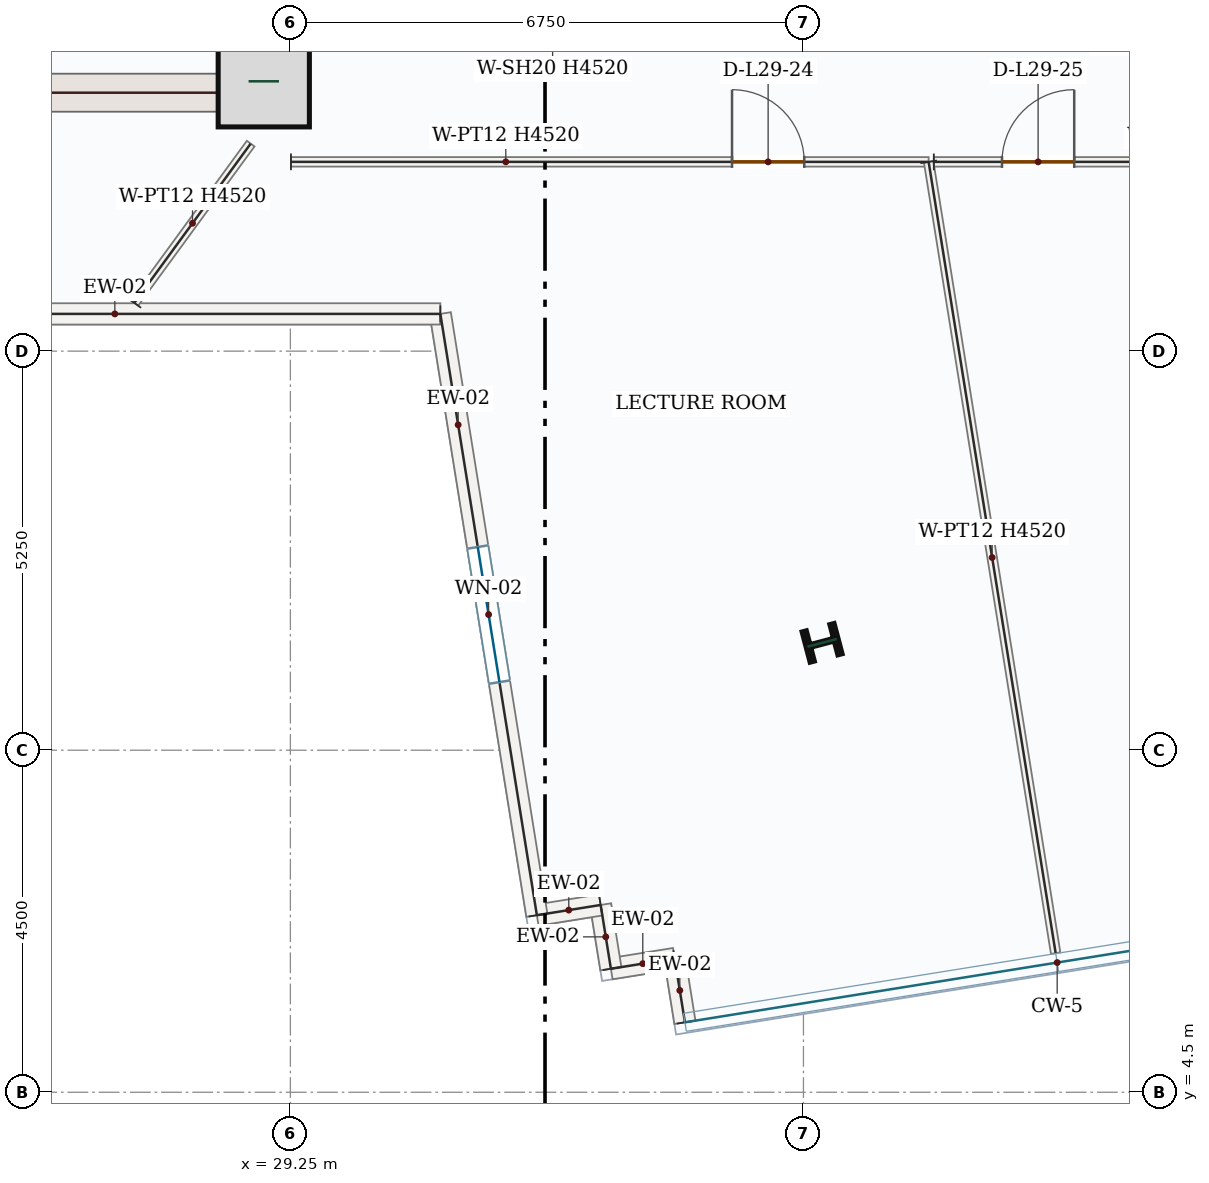
"""IFC4 building model, lengths in metres.
Left out: names, types, materials, properties, quantities, classifications, styles, units other than length and angle.
Written with IfcOpenShell. Run it as: python <this file> out.ifc"""

import sys

from ifc_helpers import new_model, si_unit, direction, frame, frame_2d, origin, origin_2d, place, context, subcontext, project, spatial, rectangle, i_section, extrude, source, transform, mapped, element, fill, save


model = new_model("IFC4")
c1 = context("Model", 3, precision=1e-05, world=origin(), true_north=direction((0.0, 1.0)))
c2 = subcontext(c1, "Body", "Model", "MODEL_VIEW")
j1 = project(units=[si_unit("LENGTHUNIT", "METRE"), si_unit("PLANEANGLEUNIT", "RADIAN")], contexts=[c1])
p1 = place(None, origin())
s1 = spatial("IfcSite", under=j1, at=p1, CompositionType="ELEMENT")
p2 = place(p1, origin())
s2 = spatial("IfcBuilding", under=s1, at=p2, CompositionType="ELEMENT")
p3 = place(p2, frame((0.0, 0.0, 130.8)))
s3 = spatial("IfcBuildingStorey", under=s2, at=p3, CompositionType="ELEMENT", Elevation=130.8)
p4 = place(p3, frame((29.0, 17.4, 0.0), z_axis=(0.0, 0.0, 1.0), x_axis=(0.0, 1.0, 0.0)))
e1 = element("IfcWall", 1, at=p4, inside=s3, PredefinedType="SHEAR", context=c2, shape_type="SweptSolid", body=[
    extrude(rectangle(XDim=8.55, YDim=0.5, at=frame_2d((4.275, 0.0))), origin(), (0.0, 0.0, 1.0), 4.52),
])
p5 = place(p4, frame((6.65, 0.0, 0.0)))
e2 = element("IfcOpeningElement", 2, at=p5, cuts=e1, PredefinedType="OPENING", context=c2, shape_type="SweptSolid", body=[
    extrude(rectangle(XDim=1.1, YDim=2.2, at=frame_2d((0.55, 1.1))), frame((0.0, 0.26, 0.0), z_axis=(0.0, -1.0, 0.0), x_axis=(1.0, 0.0, 0.0)), (0.0, 0.0, 1.0), 0.52),
])
p6 = place(p4, frame((2.7, 0.0, 0.0)))
e3 = element("IfcOpeningElement", 3, at=p6, cuts=e1, PredefinedType="OPENING", context=c2, shape_type="SweptSolid", body=[
    extrude(rectangle(XDim=0.88, YDim=2.1, at=frame_2d((0.44, 1.05))), frame((0.0, 0.26, 0.0), z_axis=(0.0, -1.0, 0.0), x_axis=(1.0, 0.0, 0.0)), (0.0, 0.0, 1.0), 0.52),
])
p7 = place(p4, frame((4.6, 0.0, 0.0)))
e4 = element("IfcOpeningElement", 4, at=p7, cuts=e1, PredefinedType="OPENING", context=c2, shape_type="SweptSolid", body=[
    extrude(rectangle(XDim=0.88, YDim=2.1, at=frame_2d((0.44, 1.05))), frame((0.0, 0.26, 0.0), z_axis=(0.0, -1.0, 0.0), x_axis=(1.0, 0.0, 0.0)), (0.0, 0.0, 1.0), 0.52),
])
m1 = source(origin(), c2, "Body", "SweptSolid", [
    extrude(rectangle(XDim=7.0, YDim=0.5, at=frame_2d((3.5, 0.0))), origin(), (0.0, 0.0, 1.0), 4.52),
])
p8 = place(p3, frame((21.75, 17.65, 0.0), z_axis=(0.0, 0.0, 1.0), x_axis=(1.0, 0.0, 0.0)))
e5 = element("IfcWall", 5, at=p8, inside=s3, PredefinedType="SHEAR", context=c2, shape_type="MappedRepresentation", body=[
    mapped(m1, transform((0.0, 0.0, 0.0), x_axis=(1.0, 0.0, 0.0), y_axis=(0.0, 1.0, 0.0), z_axis=(0.0, 0.0, 1.0), scale=1.0)),
])
m2 = source(origin(), c2, "Body", "SweptSolid", [
    extrude(rectangle(XDim=1.2, YDim=1.2, at=origin_2d()), origin(), (0.0, 0.0, 1.0), 4.8),
])
p9 = place(p3, frame((28.9, 17.8, 0.0), z_axis=(0.0, 0.0, 1.0), x_axis=(1.0, 0.0, 0.0)))
e6 = element("IfcColumn", 6, at=p9, inside=s3, PredefinedType="COLUMN", context=c2, shape_type="MappedRepresentation", body=[
    mapped(m2, transform((0.0, 0.0, 0.0), x_axis=(1.0, 0.0, 0.0), y_axis=(0.0, 1.0, 0.0), z_axis=(0.0, 0.0, 1.0), scale=1.0)),
])
m3 = source(origin(), c2, "Body", "SweptSolid", [
    extrude(i_section(OverallWidth=0.412, OverallDepth=0.435, WebThickness=0.036, FlangeThickness=0.057, FilletRadius=0.018, at=origin_2d()), origin(), (0.0, 0.0, 1.0), 4.8),
])
p10 = place(p3, frame((36.245, 10.412, 0.0), z_axis=(0.0, 0.0, 1.0), x_axis=(-0.255445757936, 0.966823388604, 0.0)))
e7 = element("IfcColumn", 7, at=p10, inside=s3, PredefinedType="COLUMN", context=c2, shape_type="MappedRepresentation", body=[
    mapped(m3, transform((0.0, 0.0, 0.0), x_axis=(1.0, 0.0, 0.0), y_axis=(0.0, 1.0, 0.0), z_axis=(0.0, 0.0, 1.0), scale=1.0)),
])
m4 = source(origin(), c2, "Body", "SweptSolid", [
    extrude(rectangle(XDim=0.85, YDim=0.28, at=frame_2d((0.425, 0.0))), origin(), (0.0, 0.0, 1.0), 4.52),
])
p11 = place(p3, frame((34.441, 5.42, 0.0), z_axis=(0.0, 0.0, 1.0), x_axis=(-0.158528116284, 0.987354463376, 0.0)))
e8 = element("IfcWall", 8, at=p11, inside=s3, PredefinedType="SOLIDWALL", context=c2, shape_type="MappedRepresentation", body=[
    mapped(m4, transform((0.0, 0.0, 0.0), x_axis=(1.0, 0.0, 0.0), y_axis=(0.0, 1.0, 0.0), z_axis=(0.0, 0.0, 1.0), scale=1.0)),
])
m5 = source(origin(), c2, "Body", "SweptSolid", [
    extrude(rectangle(XDim=0.85, YDim=0.28, at=frame_2d((0.425, 0.0))), origin(), (0.0, 0.0, 1.0), 4.52),
])
p12 = place(p3, frame((34.306, 6.259, 0.0), z_axis=(0.0, 0.0, 1.0), x_axis=(-0.98734724292, -0.15857308062, 0.0)))
e9 = element("IfcWall", 9, at=p12, inside=s3, PredefinedType="SOLIDWALL", context=c2, shape_type="MappedRepresentation", body=[
    mapped(m5, transform((0.0, 0.0, 0.0), x_axis=(1.0, 0.0, 0.0), y_axis=(0.0, 1.0, 0.0), z_axis=(0.0, 0.0, 1.0), scale=1.0)),
])
p13 = place(p3, frame((33.467, 6.125, 0.0), z_axis=(0.0, 0.0, 1.0), x_axis=(-0.158528116284, 0.987354463376, 0.0)))
e10 = element("IfcWall", 10, at=p13, inside=s3, PredefinedType="SOLIDWALL", context=c2, shape_type="MappedRepresentation", body=[
    mapped(m4, transform((0.0, 0.0, 0.0), x_axis=(1.0, 0.0, 0.0), y_axis=(0.0, 1.0, 0.0), z_axis=(0.0, 0.0, 1.0), scale=1.0)),
])
p14 = place(p3, frame((33.332, 6.964, 0.0), z_axis=(0.0, 0.0, 1.0), x_axis=(-0.98734724292, -0.15857308062, 0.0)))
e11 = element("IfcWall", 11, at=p14, inside=s3, PredefinedType="SOLIDWALL", context=c2, shape_type="MappedRepresentation", body=[
    mapped(m5, transform((0.0, 0.0, 0.0), x_axis=(1.0, 0.0, 0.0), y_axis=(0.0, 1.0, 0.0), z_axis=(0.0, 0.0, 1.0), scale=1.0)),
])
p15 = place(p3, frame((32.493, 6.829, 0.0), z_axis=(0.0, 0.0, 1.0), x_axis=(-0.158511008443, 0.987357210032, 0.0)))
e12 = element("IfcWall", 12, at=p15, inside=s3, PredefinedType="SOLIDWALL", context=c2, shape_type="SweptSolid", body=[
    extrude(rectangle(XDim=8.012, YDim=0.28, at=frame_2d((4.006, 0.0))), origin(), (0.0, 0.0, 1.0), 4.52),
])
p16 = place(p15, frame((3.106, 0.0, 0.85)))
e13 = element("IfcOpeningElement", 13, at=p16, cuts=e12, PredefinedType="OPENING", context=c2, shape_type="SweptSolid", body=[
    extrude(rectangle(XDim=1.8, YDim=1.75, at=frame_2d((0.9, 0.875))), frame((0.0, 0.15, 0.0), z_axis=(0.0, -1.0, 0.0), x_axis=(1.0, 0.0, 0.0)), (0.0, 0.0, 1.0), 0.3),
])
m6 = source(origin(), c2, "Body", "SweptSolid", [
    extrude(rectangle(XDim=8.565, YDim=0.28, at=frame_2d((4.282, 0.0))), origin(), (0.0, 0.0, 1.0), 4.52),
])
p17 = place(p3, frame((31.223, 14.74, 0.0), z_axis=(0.0, 0.0, 1.0), x_axis=(-1.0, 0.0, 0.0)))
e14 = element("IfcWall", 14, at=p17, inside=s3, PredefinedType="SOLIDWALL", context=c2, shape_type="MappedRepresentation", body=[
    mapped(m6, transform((0.0, 0.0, 0.0), x_axis=(1.0, 0.0, 0.0), y_axis=(0.0, 1.0, 0.0), z_axis=(0.0, 0.0, 1.0), scale=1.0)),
])
p18 = place(p3, frame((29.258, 16.74, 0.0), z_axis=(0.0, 0.0, 1.0), x_axis=(0.999999999577, -2.9101068e-05, 0.0)))
e15 = element("IfcWall", 15, at=p18, inside=s3, PredefinedType="PARTITIONING", context=c2, shape_type="SweptSolid", body=[
    extrude(rectangle(XDim=8.389, YDim=0.125, at=frame_2d((4.195, 0.0))), origin(), (0.0, 0.0, 1.0), 4.52),
])
p19 = place(p18, frame((5.803, 0.0, 0.0)))
e16 = element("IfcOpeningElement", 16, at=p19, cuts=e15, PredefinedType="OPENING", context=c2, shape_type="SweptSolid", body=[
    extrude(rectangle(XDim=0.95, YDim=2.15, at=frame_2d((0.475, 1.075))), frame((0.0, 0.073, 0.0), z_axis=(0.0, -1.0, 0.0), x_axis=(1.0, 0.0, 0.0)), (0.0, 0.0, 1.0), 0.145),
])
m7 = source(origin(), c2, "Body", "SweptSolid", [
    extrude(rectangle(XDim=10.544, YDim=0.125, at=frame_2d((5.272, 0.0))), origin(), (0.0, 0.0, 1.0), 4.52),
])
p20 = place(p3, frame((37.647, 16.74, 0.0), z_axis=(0.0, 0.0, 1.0), x_axis=(0.158497112457, -0.987359440803, 0.0)))
e17 = element("IfcWall", 17, at=p20, inside=s3, PredefinedType="PARTITIONING", context=c2, shape_type="MappedRepresentation", body=[
    mapped(m7, transform((0.0, 0.0, 0.0), x_axis=(1.0, 0.0, 0.0), y_axis=(0.0, 1.0, 0.0), z_axis=(0.0, 0.0, 1.0), scale=1.0)),
])
m8 = source(origin(), c2, "Body", "SweptSolid", [
    extrude(rectangle(XDim=2.594, YDim=0.125, at=frame_2d((1.297, 0.0))), origin(), (0.0, 0.0, 1.0), 4.52),
])
p21 = place(p3, frame((27.197, 14.885, 0.0), z_axis=(0.0, 0.0, 1.0), x_axis=(0.589910415932, 0.807468699811, 0.0)))
e18 = element("IfcWall", 18, at=p21, inside=s3, PredefinedType="PARTITIONING", context=c2, shape_type="MappedRepresentation", body=[
    mapped(m8, transform((0.0, 0.0, 0.0), x_axis=(1.0, 0.0, 0.0), y_axis=(0.0, 1.0, 0.0), z_axis=(0.0, 0.0, 1.0), scale=1.0)),
])
p22 = place(p3, frame((37.715, 16.74, 0.0), z_axis=(0.0, 0.0, 1.0), x_axis=(0.999999998821, 4.8564907e-05, 0.0)))
e19 = element("IfcWall", 19, at=p22, inside=s3, PredefinedType="PARTITIONING", context=c2, shape_type="SweptSolid", body=[
    extrude(rectangle(XDim=5.027, YDim=0.125, at=frame_2d((2.514, 0.0))), origin(), (0.0, 0.0, 1.0), 3.979),
])
p23 = place(p22, frame((0.897, 0.0, 0.0)))
e20 = element("IfcOpeningElement", 20, at=p23, cuts=e19, PredefinedType="OPENING", context=c2, shape_type="SweptSolid", body=[
    extrude(rectangle(XDim=0.95, YDim=2.15, at=frame_2d((0.475, 1.075))), frame((0.0, 0.073, 0.0), z_axis=(0.0, -1.0, 0.0), x_axis=(1.0, 0.0, 0.0)), (0.0, 0.0, 1.0), 0.145),
])
m9 = source(origin(), c2, "Body", "SweptSolid", [
    extrude(rectangle(XDim=1.8, YDim=1.75, at=frame_2d((0.9, 0.875))), frame((0.0, 0.03, 0.0), z_axis=(0.0, -1.0, 0.0), x_axis=(1.0, 0.0, 0.0)), (0.0, 0.0, 1.0), 0.06),
])
p24 = place(p16, origin())
e21 = element("IfcWindow", 21, at=p24, inside=s3, PartitioningType="DOUBLE_PANEL_VERTICAL", PredefinedType="WINDOW", context=c2, shape_type="MappedRepresentation", body=[
    mapped(m9, transform((0.0, 0.0, 0.0), x_axis=(1.0, 0.0, 0.0), y_axis=(0.0, 1.0, 0.0), z_axis=(0.0, 0.0, 1.0), scale=1.0)),
])
fill(e13, e21)
m10 = source(origin(), c2, "Body", "SweptSolid", [
    extrude(rectangle(XDim=0.95, YDim=2.15, at=frame_2d((0.475, 1.075))), frame((0.0, 0.025, 0.0), z_axis=(0.0, -1.0, 0.0), x_axis=(1.0, 0.0, 0.0)), (0.0, 0.0, 1.0), 0.05),
])
p25 = place(p19, origin())
e22 = element("IfcDoor", 22, at=p25, inside=s3, OperationType="SINGLE_SWING_LEFT", PredefinedType="DOOR", context=c2, shape_type="MappedRepresentation", body=[
    mapped(m10, transform((0.0, 0.0, 0.0), x_axis=(1.0, 0.0, 0.0), y_axis=(0.0, 1.0, 0.0), z_axis=(0.0, 0.0, 1.0), scale=1.0)),
])
fill(e16, e22)
p26 = place(p23, origin())
e23 = element("IfcDoor", 23, at=p26, inside=s3, OperationType="SINGLE_SWING_RIGHT", PredefinedType="DOOR", context=c2, shape_type="MappedRepresentation", body=[
    mapped(m10, transform((0.0, 0.0, 0.0), x_axis=(1.0, 0.0, 0.0), y_axis=(0.0, 1.0, 0.0), z_axis=(0.0, 0.0, 1.0), scale=1.0)),
])
fill(e20, e23)
save(model, sys.argv[1])
